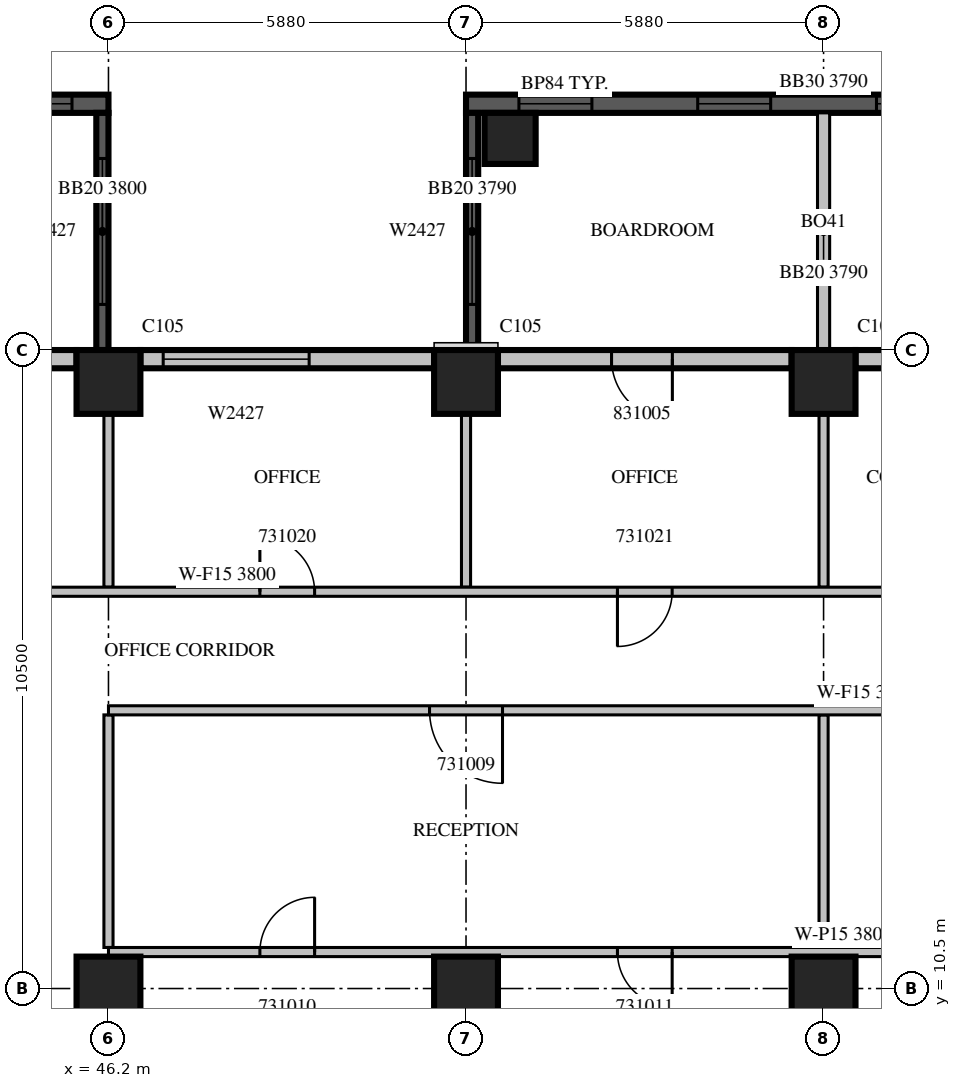
"""IFC4 building model, lengths in metres.
Left out: names, types, materials, properties, quantities, classifications, styles, units other than length and angle.
Written with IfcOpenShell. Run it as: python <this file> out.ifc"""

import sys

from ifc_helpers import new_model, si_unit, direction, frame, frame_2d, origin, origin_2d, place, context, subcontext, project, spatial, rectangle, extrude, source, transform, mapped, element, fill, save


model = new_model("IFC4")
c1 = context("Model", 3, precision=1e-05, world=origin(), true_north=direction((0.0, 1.0)))
c2 = subcontext(c1, "Body", "Model", "MODEL_VIEW")
j1 = project(units=[si_unit("LENGTHUNIT", "METRE"), si_unit("PLANEANGLEUNIT", "RADIAN")], contexts=[c1])
p1 = place(None, origin())
s1 = spatial("IfcSite", under=j1, at=p1, CompositionType="ELEMENT")
p2 = place(p1, origin())
s2 = spatial("IfcBuilding", under=s1, at=p2, CompositionType="ELEMENT")
p3 = place(p2, frame((0.0, 0.0, 141.3)))
s3 = spatial("IfcBuildingStorey", under=s2, at=p3, CompositionType="ELEMENT", Elevation=141.3)
m1 = source(origin(), c2, "Body", "SweptSolid", [
    extrude(rectangle(XDim=1.05, YDim=1.05, at=origin_2d()), origin(), (0.0, 0.0, 1.0), 4.2),
])
for number, where, z_axis, x_axis in (
    (1, (46.2, 10.5, 0.0), (0.0, 0.0, 1.0), (1.0, 0.0, 0.0)),
    (2, (52.08, 10.5, 0.0), (0.0, 0.0, 1.0), (1.0, 0.0, 0.0)),
    (3, (57.96, 10.5, 0.0), (0.0, 0.0, 1.0), (1.0, 0.0, 0.0)),
    (4, (46.2, 20.475, 0.0), (0.0, 0.0, 1.0), (1.0, 0.0, 0.0)),
    (5, (52.08, 20.475, 0.0), (0.0, 0.0, 1.0), (1.0, 0.0, 0.0)),
    (6, (57.96, 20.475, 0.0), (0.0, 0.0, 1.0), (1.0, 0.0, 0.0)),
):
    element("IfcColumn", number, at=place(p3, frame(where, z_axis=z_axis, x_axis=x_axis)), inside=s3, PredefinedType="COLUMN", context=c2, shape_type="MappedRepresentation", body=[
        mapped(m1, transform((0.0, 0.0, 0.0), scale=1.0)),
    ])
m2 = source(origin(), c2, "Body", "SweptSolid", [
    extrude(rectangle(XDim=0.84, YDim=0.84, at=origin_2d()), origin(), (0.0, 0.0, 1.0), 4.2),
])
p4 = place(p3, frame((52.805, 24.48, 0.0), z_axis=(0.0, 0.0, 1.0), x_axis=(1.0, 0.0, 0.0)))
e7 = element("IfcColumn", 7, at=p4, inside=s3, PredefinedType="COLUMN", context=c2, shape_type="MappedRepresentation", body=[
    mapped(m2, transform((0.0, 0.0, 0.0), scale=1.0)),
])
m3 = source(origin(), c2, "Body", "SweptSolid", [
    extrude(rectangle(XDim=11.76, YDim=0.3, at=frame_2d((5.88, 0.0))), origin(), (0.0, 0.0, 1.0), 3.79),
])
p5 = place(p3, frame((63.84, 25.05, 0.0), z_axis=(0.0, 0.0, 1.0), x_axis=(-1.0, 0.0, 0.0)))
e8 = element("IfcWall", 8, at=p5, inside=s3, PredefinedType="SOLIDWALL", context=c2, shape_type="MappedRepresentation", body=[
    mapped(m3, transform((0.0, 0.0, 0.0), scale=1.0)),
])
m4 = source(origin(), c2, "Body", "SweptSolid", [
    extrude(rectangle(XDim=1.2, YDim=2.7, at=frame_2d((0.6, 1.35))), frame((0.0, 0.16, 0.0), z_axis=(0.0, -1.0, 0.0), x_axis=(1.0, 0.0, 0.0)), (0.0, 0.0, 1.0), 0.32),
])
p6 = place(p5, frame((0.87, 0.0, 0.6)))
e9 = element("IfcOpeningElement", 9, at=p6, cuts=e8, PredefinedType="OPENING", context=c2, shape_type="MappedRepresentation", body=[
    mapped(m4, transform((0.0, 0.0, 0.0), scale=1.0)),
])
p7 = place(p5, frame((3.81, 0.0, 0.6)))
e10 = element("IfcOpeningElement", 10, at=p7, cuts=e8, PredefinedType="OPENING", context=c2, shape_type="MappedRepresentation", body=[
    mapped(m4, transform((0.0, 0.0, 0.0), scale=1.0)),
])
p8 = place(p5, frame((6.75, 0.0, 0.6)))
e11 = element("IfcOpeningElement", 11, at=p8, cuts=e8, PredefinedType="OPENING", context=c2, shape_type="MappedRepresentation", body=[
    mapped(m4, transform((0.0, 0.0, 0.0), scale=1.0)),
])
p9 = place(p5, frame((9.69, 0.0, 0.6)))
e12 = element("IfcOpeningElement", 12, at=p9, cuts=e8, PredefinedType="OPENING", context=c2, shape_type="MappedRepresentation", body=[
    mapped(m4, transform((0.0, 0.0, 0.0), scale=1.0)),
])
m5 = source(origin(), c2, "Body", "SweptSolid", [
    extrude(rectangle(XDim=3.9, YDim=0.2, at=frame_2d((1.95, 0.0))), origin(), (0.0, 0.0, 1.0), 3.79),
])
p10 = place(p3, frame((57.96, 21.0, 0.0), z_axis=(0.0, 0.0, 1.0), x_axis=(0.0, 1.0, 0.0)))
e13 = element("IfcWall", 13, at=p10, inside=s3, PredefinedType="SOLIDWALL", context=c2, shape_type="MappedRepresentation", body=[
    mapped(m5, transform((0.0, 0.0, 0.0), scale=1.0)),
])
m6 = source(origin(), c2, "Body", "SweptSolid", [
    extrude(rectangle(XDim=3.9, YDim=0.2, at=frame_2d((1.95, 0.0))), origin(), (0.0, 0.0, 1.0), 3.79),
])
p11 = place(p3, frame((52.18, 21.0, 0.0), z_axis=(0.0, 0.0, 1.0), x_axis=(0.0, 1.0, 0.0)))
e14 = element("IfcWall", 14, at=p11, inside=s3, PredefinedType="SOLIDWALL", context=c2, shape_type="MappedRepresentation", body=[
    mapped(m6, transform((0.0, 0.0, 0.0), scale=1.0)),
])
m7 = source(origin(), c2, "Body", "SweptSolid", [
    extrude(rectangle(XDim=2.4, YDim=2.7, at=frame_2d((1.2, 1.35))), frame((0.0, 0.11, 0.0), z_axis=(0.0, -1.0, 0.0), x_axis=(1.0, 0.0, 0.0)), (0.0, 0.0, 1.0), 0.22),
])
p12 = place(p11, frame((0.75, 0.0, 0.6)))
e15 = element("IfcOpeningElement", 15, at=p12, cuts=e14, PredefinedType="OPENING", context=c2, shape_type="MappedRepresentation", body=[
    mapped(m7, transform((0.0, 0.0, 0.0), scale=1.0)),
])
m8 = source(origin(), c2, "Body", "SweptSolid", [
    extrude(rectangle(XDim=4.2, YDim=0.3, at=frame_2d((2.1, 0.0))), origin(), (0.0, 0.0, 1.0), 3.8),
])
p13 = place(p3, frame((46.2, 25.05, 0.0), z_axis=(0.0, 0.0, 1.0), x_axis=(-1.0, 0.0, 0.0)))
e16 = element("IfcWall", 16, at=p13, inside=s3, PredefinedType="SOLIDWALL", context=c2, shape_type="MappedRepresentation", body=[
    mapped(m8, transform((0.0, 0.0, 0.0), scale=1.0)),
])
m9 = source(origin(), c2, "Body", "SweptSolid", [
    extrude(rectangle(XDim=3.0, YDim=2.7, at=frame_2d((1.5, 1.35))), frame((0.0, 0.16, 0.0), z_axis=(0.0, -1.0, 0.0), x_axis=(1.0, 0.0, 0.0)), (0.0, 0.0, 1.0), 0.32),
])
p14 = place(p13, frame((0.6, 0.0, 0.6)))
e17 = element("IfcOpeningElement", 17, at=p14, cuts=e16, PredefinedType="OPENING", context=c2, shape_type="MappedRepresentation", body=[
    mapped(m9, transform((0.0, 0.0, 0.0), scale=1.0)),
])
m10 = source(origin(), c2, "Body", "SweptSolid", [
    extrude(rectangle(XDim=3.9, YDim=0.2, at=frame_2d((1.95, 0.0))), origin(), (0.0, 0.0, 1.0), 3.8),
])
p15 = place(p3, frame((46.1, 21.0, 0.0), z_axis=(0.0, 0.0, 1.0), x_axis=(0.0, 1.0, 0.0)))
e18 = element("IfcWall", 18, at=p15, inside=s3, PredefinedType="SOLIDWALL", context=c2, shape_type="MappedRepresentation", body=[
    mapped(m10, transform((0.0, 0.0, 0.0), scale=1.0)),
])
p16 = place(p15, frame((0.75, 0.0, 0.6)))
e19 = element("IfcOpeningElement", 19, at=p16, cuts=e18, PredefinedType="OPENING", context=c2, shape_type="MappedRepresentation", body=[
    mapped(m7, transform((0.0, 0.0, 0.0), scale=1.0)),
])
m11 = source(origin(), c2, "Body", "SweptSolid", [
    extrude(rectangle(XDim=4.83, YDim=0.3, at=frame_2d((2.415, 0.0))), origin(), (0.0, 0.0, 1.0), 3.8),
])
p17 = place(p3, frame((63.315, 20.85, 0.0), z_axis=(0.0, 0.0, 1.0), x_axis=(-1.0, 0.0, 0.0)))
e20 = element("IfcWall", 20, at=p17, inside=s3, PredefinedType="STANDARD", context=c2, shape_type="MappedRepresentation", body=[
    mapped(m11, transform((0.0, 0.0, 0.0), scale=1.0)),
])
m12 = source(origin(), c2, "Body", "SweptSolid", [
    extrude(rectangle(XDim=1.0, YDim=2.1, at=frame_2d((0.5, 1.05))), frame((0.0, 0.16, 0.0), z_axis=(0.0, -1.0, 0.0), x_axis=(1.0, 0.0, 0.0)), (0.0, 0.0, 1.0), 0.32),
])
p18 = place(p17, frame((2.242, 0.0, 0.0)))
e21 = element("IfcOpeningElement", 21, at=p18, cuts=e20, PredefinedType="OPENING", context=c2, shape_type="MappedRepresentation", body=[
    mapped(m12, transform((0.0, 0.0, 0.0), scale=1.0)),
])
p19 = place(p3, frame((57.435, 20.85, 0.0), z_axis=(0.0, 0.0, 1.0), x_axis=(-1.0, 0.0, 0.0)))
e22 = element("IfcWall", 22, at=p19, inside=s3, PredefinedType="STANDARD", context=c2, shape_type="MappedRepresentation", body=[
    mapped(m11, transform((0.0, 0.0, 0.0), scale=1.0)),
])
p20 = place(p19, frame((1.962, 0.0, 0.0)))
e23 = element("IfcOpeningElement", 23, at=p20, cuts=e22, PredefinedType="OPENING", context=c2, shape_type="MappedRepresentation", body=[
    mapped(m12, transform((0.0, 0.0, 0.0), scale=1.0)),
])
p21 = place(p3, frame((51.555, 20.85, 0.0), z_axis=(0.0, 0.0, 1.0), x_axis=(-1.0, 0.0, 0.0)))
e24 = element("IfcWall", 24, at=p21, inside=s3, PredefinedType="STANDARD", context=c2, shape_type="MappedRepresentation", body=[
    mapped(m11, transform((0.0, 0.0, 0.0), scale=1.0)),
])
m13 = source(origin(), c2, "Body", "SweptSolid", [
    extrude(rectangle(XDim=2.4, YDim=2.7, at=frame_2d((1.2, 1.35))), frame((0.0, 0.16, 0.0), z_axis=(0.0, -1.0, 0.0), x_axis=(1.0, 0.0, 0.0)), (0.0, 0.0, 1.0), 0.32),
])
p22 = place(p21, frame((2.055, 0.0, 0.6)))
e25 = element("IfcOpeningElement", 25, at=p22, cuts=e24, PredefinedType="OPENING", context=c2, shape_type="MappedRepresentation", body=[
    mapped(m13, transform((0.0, 0.0, 0.0), scale=1.0)),
])
m14 = source(origin(), c2, "Body", "SweptSolid", [
    extrude(rectangle(XDim=7.35, YDim=0.3, at=frame_2d((3.675, 0.0))), origin(), (0.0, 0.0, 1.0), 3.8),
])
p23 = place(p3, frame((45.675, 20.85, 0.0), z_axis=(0.0, 0.0, 1.0), x_axis=(-1.0, 0.0, 0.0)))
e26 = element("IfcWall", 26, at=p23, inside=s3, PredefinedType="STANDARD", context=c2, shape_type="MappedRepresentation", body=[
    mapped(m14, transform((0.0, 0.0, 0.0), scale=1.0)),
])
p24 = place(p23, frame((1.075, 0.0, 0.0)))
e27 = element("IfcOpeningElement", 27, at=p24, cuts=e26, PredefinedType="OPENING", context=c2, shape_type="MappedRepresentation", body=[
    mapped(m12, transform((0.0, 0.0, 0.0), scale=1.0)),
])
m15 = source(origin(), c2, "Body", "SweptSolid", [
    extrude(rectangle(XDim=3.825, YDim=0.15, at=frame_2d((1.913, 0.0))), origin(), (0.0, 0.0, 1.0), 3.8),
])
for number, where, z_axis, x_axis in (
    (28, (46.2, 11.175, 0.0), (0.0, 0.0, 1.0), (0.0, 1.0, 0.0)),
    (29, (57.96, 11.175, 0.0), (0.0, 0.0, 1.0), (0.0, 1.0, 0.0)),
):
    element("IfcWall", number, at=place(p3, frame(where, z_axis=z_axis, x_axis=x_axis)), inside=s3, PredefinedType="PARTITIONING", context=c2, shape_type="MappedRepresentation", body=[
        mapped(m15, transform((0.0, 0.0, 0.0), scale=1.0)),
    ])
m16 = source(origin(), c2, "Body", "SweptSolid", [
    extrude(rectangle(XDim=24.9, YDim=0.15, at=frame_2d((12.45, 0.0))), origin(), (0.0, 0.0, 1.0), 3.8),
])
p25 = place(p3, frame((71.1, 11.1, 0.0), z_axis=(0.0, 0.0, 1.0), x_axis=(-1.0, 0.0, 0.0)))
e30 = element("IfcWall", 30, at=p25, inside=s3, PredefinedType="PARTITIONING", context=c2, shape_type="MappedRepresentation", body=[
    mapped(m16, transform((0.0, 0.0, 0.0), scale=1.0)),
])
m17 = source(origin(), c2, "Body", "SweptSolid", [
    extrude(rectangle(XDim=0.9, YDim=2.1, at=frame_2d((0.45, 1.05))), frame((0.0, 0.085, 0.0), z_axis=(0.0, -1.0, 0.0), x_axis=(1.0, 0.0, 0.0)), (0.0, 0.0, 1.0), 0.17),
])
p26 = place(p25, frame((21.51, 0.0, 0.0)))
e31 = element("IfcOpeningElement", 31, at=p26, cuts=e30, PredefinedType="OPENING", context=c2, shape_type="MappedRepresentation", body=[
    mapped(m17, transform((0.0, 0.0, 0.0), scale=1.0)),
])
p27 = place(p25, frame((15.63, 0.0, 0.0)))
e32 = element("IfcOpeningElement", 32, at=p27, cuts=e30, PredefinedType="OPENING", context=c2, shape_type="MappedRepresentation", body=[
    mapped(m17, transform((0.0, 0.0, 0.0), scale=1.0)),
])
p28 = place(p25, frame((9.75, 0.0, 0.0)))
e33 = element("IfcOpeningElement", 33, at=p28, cuts=e30, PredefinedType="OPENING", context=c2, shape_type="MappedRepresentation", body=[
    mapped(m17, transform((0.0, 0.0, 0.0), scale=1.0)),
])
p29 = place(p25, frame((4.645, 0.0, 0.0)))
e34 = element("IfcOpeningElement", 34, at=p29, cuts=e30, PredefinedType="OPENING", context=c2, shape_type="MappedRepresentation", body=[
    mapped(m17, transform((0.0, 0.0, 0.0), scale=1.0)),
])
p30 = place(p25, frame((2.205, 0.0, 0.0)))
e35 = element("IfcOpeningElement", 35, at=p30, cuts=e30, PredefinedType="OPENING", context=c2, shape_type="MappedRepresentation", body=[
    mapped(m17, transform((0.0, 0.0, 0.0), scale=1.0)),
])
m18 = source(origin(), c2, "Body", "SweptSolid", [
    extrude(rectangle(XDim=2.851, YDim=0.15, at=frame_2d((1.425, 0.0))), origin(), (0.0, 0.0, 1.0), 3.8),
])
for number, where, z_axis, x_axis in (
    (36, (52.08, 19.951, 0.0), (0.0, 0.0, 1.0), (0.0, -1.0, 0.0)),
    (37, (46.2, 17.1, 0.0), (0.0, 0.0, 1.0), (0.0, 1.0, 0.0)),
    (38, (57.96, 17.1, 0.0), (0.0, 0.0, 1.0), (0.0, 1.0, 0.0)),
):
    element("IfcWall", number, at=place(p3, frame(where, z_axis=z_axis, x_axis=x_axis)), inside=s3, PredefinedType="PARTITIONING", context=c2, shape_type="MappedRepresentation", body=[
        mapped(m18, transform((0.0, 0.0, 0.0), scale=1.0)),
    ])
p31 = place(p3, frame((71.1, 15.075, 0.0), z_axis=(0.0, 0.0, 1.0), x_axis=(-1.0, 0.0, 0.0)))
e39 = element("IfcWall", 39, at=p31, inside=s3, PredefinedType="PARTITIONING", context=c2, shape_type="MappedRepresentation", body=[
    mapped(m16, transform((0.0, 0.0, 0.0), scale=1.0)),
])
m19 = source(origin(), c2, "Body", "SweptSolid", [
    extrude(rectangle(XDim=1.2, YDim=2.1, at=frame_2d((0.6, 1.05))), frame((0.0, 0.085, 0.0), z_axis=(0.0, -1.0, 0.0), x_axis=(1.0, 0.0, 0.0)), (0.0, 0.0, 1.0), 0.17),
])
p32 = place(p31, frame((18.42, 0.0, 0.0)))
e40 = element("IfcOpeningElement", 40, at=p32, cuts=e39, PredefinedType="OPENING", context=c2, shape_type="MappedRepresentation", body=[
    mapped(m19, transform((0.0, 0.0, 0.0), scale=1.0)),
])
p33 = place(p31, frame((5.933, 0.0, 0.0)))
e41 = element("IfcOpeningElement", 41, at=p33, cuts=e39, PredefinedType="OPENING", context=c2, shape_type="MappedRepresentation", body=[
    mapped(m19, transform((0.0, 0.0, 0.0), scale=1.0)),
])
m20 = source(origin(), c2, "Body", "SweptSolid", [
    extrude(rectangle(XDim=37.5, YDim=0.15, at=frame_2d((18.75, 0.0))), origin(), (0.0, 0.0, 1.0), 3.8),
])
p34 = place(p3, frame((29.4, 17.025, 0.0), z_axis=(0.0, 0.0, 1.0), x_axis=(1.0, 0.0, 0.0)))
e42 = element("IfcWall", 42, at=p34, inside=s3, PredefinedType="PARTITIONING", context=c2, shape_type="MappedRepresentation", body=[
    mapped(m20, transform((0.0, 0.0, 0.0), scale=1.0)),
])
m21 = source(origin(), c2, "Body", "SweptSolid", [
    extrude(rectangle(XDim=1.0, YDim=2.1, at=frame_2d((0.5, 1.05))), frame((0.0, 0.085, 0.0), z_axis=(0.0, -1.0, 0.0), x_axis=(1.0, 0.0, 0.0)), (0.0, 0.0, 1.0), 0.17),
])
p35 = place(p34, frame((1.357, 0.0, 0.0)))
e43 = element("IfcOpeningElement", 43, at=p35, cuts=e42, PredefinedType="OPENING", context=c2, shape_type="MappedRepresentation", body=[
    mapped(m21, transform((0.0, 0.0, 0.0), scale=1.0)),
])
p36 = place(p34, frame((4.669, 0.0, 0.0)))
e44 = element("IfcOpeningElement", 44, at=p36, cuts=e42, PredefinedType="OPENING", context=c2, shape_type="MappedRepresentation", body=[
    mapped(m21, transform((0.0, 0.0, 0.0), scale=1.0)),
])
p37 = place(p34, frame((7.012, 0.0, 0.0)))
e45 = element("IfcOpeningElement", 45, at=p37, cuts=e42, PredefinedType="OPENING", context=c2, shape_type="MappedRepresentation", body=[
    mapped(m21, transform((0.0, 0.0, 0.0), scale=1.0)),
])
p38 = place(p34, frame((12.0, 0.0, 0.0)))
e46 = element("IfcOpeningElement", 46, at=p38, cuts=e42, PredefinedType="OPENING", context=c2, shape_type="MappedRepresentation", body=[
    mapped(m19, transform((0.0, 0.0, 0.0), scale=1.0)),
])
p39 = place(p34, frame((19.29, 0.0, 0.0)))
e47 = element("IfcOpeningElement", 47, at=p39, cuts=e42, PredefinedType="OPENING", context=c2, shape_type="MappedRepresentation", body=[
    mapped(m17, transform((0.0, 0.0, 0.0), scale=1.0)),
])
p40 = place(p34, frame((25.17, 0.0, 0.0)))
e48 = element("IfcOpeningElement", 48, at=p40, cuts=e42, PredefinedType="OPENING", context=c2, shape_type="MappedRepresentation", body=[
    mapped(m17, transform((0.0, 0.0, 0.0), scale=1.0)),
])
p41 = place(p34, frame((30.214, 0.0, 0.0)))
e49 = element("IfcOpeningElement", 49, at=p41, cuts=e42, PredefinedType="OPENING", context=c2, shape_type="MappedRepresentation", body=[
    mapped(m19, transform((0.0, 0.0, 0.0), scale=1.0)),
])
p42 = place(p34, frame((34.721, 0.0, 0.0)))
e50 = element("IfcOpeningElement", 50, at=p42, cuts=e42, PredefinedType="OPENING", context=c2, shape_type="MappedRepresentation", body=[
    mapped(m19, transform((0.0, 0.0, 0.0), scale=1.0)),
])
m22 = source(origin(), c2, "Body", "SweptSolid", [
    extrude(rectangle(XDim=1.2, YDim=2.7, at=frame_2d((0.6, 1.35))), frame((0.0, 0.03, 0.0), z_axis=(0.0, -1.0, 0.0), x_axis=(1.0, 0.0, 0.0)), (0.0, 0.0, 1.0), 0.06),
])
p43 = place(p7, origin())
e51 = element("IfcWindow", 51, at=p43, inside=s3, PartitioningType="SINGLE_PANEL", PredefinedType="WINDOW", context=c2, shape_type="MappedRepresentation", body=[
    mapped(m22, transform((0.0, 0.0, 0.0), scale=1.0)),
])
fill(e10, e51)
p44 = place(p8, origin())
e52 = element("IfcWindow", 52, at=p44, inside=s3, PartitioningType="SINGLE_PANEL", PredefinedType="WINDOW", context=c2, shape_type="MappedRepresentation", body=[
    mapped(m22, transform((0.0, 0.0, 0.0), scale=1.0)),
])
fill(e11, e52)
p45 = place(p9, origin())
e53 = element("IfcWindow", 53, at=p45, inside=s3, PartitioningType="SINGLE_PANEL", PredefinedType="WINDOW", context=c2, shape_type="MappedRepresentation", body=[
    mapped(m22, transform((0.0, 0.0, 0.0), scale=1.0)),
])
fill(e12, e53)
m23 = source(origin(), c2, "Body", "SweptSolid", [
    extrude(rectangle(XDim=2.4, YDim=2.7, at=frame_2d((1.2, 1.35))), frame((0.0, 0.03, 0.0), z_axis=(0.0, -1.0, 0.0), x_axis=(1.0, 0.0, 0.0)), (0.0, 0.0, 1.0), 0.06),
])
p46 = place(p12, origin())
e54 = element("IfcWindow", 54, at=p46, inside=s3, PartitioningType="SINGLE_PANEL", PredefinedType="WINDOW", context=c2, shape_type="MappedRepresentation", body=[
    mapped(m23, transform((0.0, 0.0, 0.0), scale=1.0)),
])
fill(e15, e54)
m24 = source(origin(), c2, "Body", "SweptSolid", [
    extrude(rectangle(XDim=3.0, YDim=2.7, at=frame_2d((1.5, 1.35))), frame((0.0, 0.03, 0.0), z_axis=(0.0, -1.0, 0.0), x_axis=(1.0, 0.0, 0.0)), (0.0, 0.0, 1.0), 0.06),
])
p47 = place(p14, origin())
e55 = element("IfcWindow", 55, at=p47, inside=s3, PartitioningType="SINGLE_PANEL", PredefinedType="WINDOW", context=c2, shape_type="MappedRepresentation", body=[
    mapped(m24, transform((0.0, 0.0, 0.0), scale=1.0)),
])
fill(e17, e55)
p48 = place(p16, origin())
e56 = element("IfcWindow", 56, at=p48, inside=s3, PartitioningType="SINGLE_PANEL", PredefinedType="WINDOW", context=c2, shape_type="MappedRepresentation", body=[
    mapped(m23, transform((0.0, 0.0, 0.0), scale=1.0)),
])
fill(e19, e56)
p49 = place(p22, origin())
e57 = element("IfcWindow", 57, at=p49, inside=s3, PartitioningType="SINGLE_PANEL", PredefinedType="WINDOW", context=c2, shape_type="MappedRepresentation", body=[
    mapped(m23, transform((0.0, 0.0, 0.0), scale=1.0)),
])
fill(e25, e57)
m25 = source(origin(), c2, "Body", "SweptSolid", [
    extrude(rectangle(XDim=1.2, YDim=2.1, at=frame_2d((0.6, 1.05))), frame((0.0, 0.025, 0.0), z_axis=(0.0, -1.0, 0.0), x_axis=(1.0, 0.0, 0.0)), (0.0, 0.0, 1.0), 0.05),
])
p50 = place(p32, origin())
e58 = element("IfcDoor", 58, at=p50, inside=s3, OperationType="SINGLE_SWING_LEFT", PredefinedType="DOOR", context=c2, shape_type="MappedRepresentation", body=[
    mapped(m25, transform((0.0, 0.0, 0.0), scale=1.0)),
])
fill(e40, e58)
m26 = source(origin(), c2, "Body", "SweptSolid", [
    extrude(rectangle(XDim=0.9, YDim=2.1, at=frame_2d((0.45, 1.05))), frame((0.0, 0.025, 0.0), z_axis=(0.0, -1.0, 0.0), x_axis=(1.0, 0.0, 0.0)), (0.0, 0.0, 1.0), 0.05),
])
p51 = place(p26, origin())
e59 = element("IfcDoor", 59, at=p51, inside=s3, OperationType="SINGLE_SWING_RIGHT", PredefinedType="DOOR", context=c2, shape_type="MappedRepresentation", body=[
    mapped(m26, transform((0.0, 0.0, 0.0), scale=1.0)),
])
fill(e31, e59)
p52 = place(p27, origin())
e60 = element("IfcDoor", 60, at=p52, inside=s3, OperationType="SINGLE_SWING_LEFT", PredefinedType="DOOR", context=c2, shape_type="MappedRepresentation", body=[
    mapped(m26, transform((0.0, 0.0, 0.0), scale=1.0)),
])
fill(e32, e60)
p53 = place(p39, origin())
e61 = element("IfcDoor", 61, at=p53, inside=s3, OperationType="SINGLE_SWING_LEFT", PredefinedType="DOOR", context=c2, shape_type="MappedRepresentation", body=[
    mapped(m26, transform((0.0, 0.0, 0.0), scale=1.0)),
])
fill(e47, e61)
p54 = place(p40, origin())
e62 = element("IfcDoor", 62, at=p54, inside=s3, OperationType="SINGLE_SWING_RIGHT", PredefinedType="DOOR", context=c2, shape_type="MappedRepresentation", body=[
    mapped(m26, transform((0.0, 0.0, 0.0), scale=1.0)),
])
fill(e48, e62)
m27 = source(origin(), c2, "Body", "SweptSolid", [
    extrude(rectangle(XDim=1.0, YDim=2.1, at=frame_2d((0.5, 1.05))), frame((0.0, 0.025, 0.0), z_axis=(0.0, -1.0, 0.0), x_axis=(1.0, 0.0, 0.0)), (0.0, 0.0, 1.0), 0.05),
])
p55 = place(p20, origin())
e63 = element("IfcDoor", 63, at=p55, inside=s3, OperationType="SINGLE_SWING_LEFT", PredefinedType="DOOR", context=c2, shape_type="MappedRepresentation", body=[
    mapped(m27, transform((0.0, 0.0, 0.0), scale=1.0)),
])
fill(e23, e63)
save(model, sys.argv[1])
